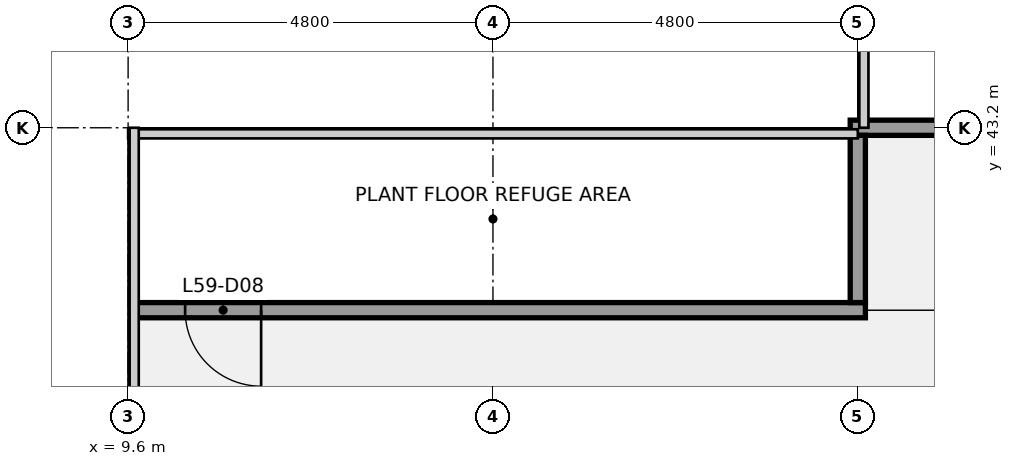
"""IFC4 building model, lengths in metres.
Left out: names, types, materials, properties, quantities, classifications, styles, units other than length and angle.
Written with IfcOpenShell. Run it as: python <this file> out.ifc"""

import sys

from ifc_helpers import new_model, si_unit, direction, frame, frame_2d, origin, place, context, subcontext, project, spatial, rectangle, extrude, element, fill, save


model = new_model("IFC4")
c1 = context("Model", 3, precision=1e-05, world=origin(), true_north=direction((0.0, 1.0)))
c2 = subcontext(c1, "Body", "Model", "MODEL_VIEW")
j1 = project(units=[si_unit("LENGTHUNIT", "METRE"), si_unit("PLANEANGLEUNIT", "RADIAN")], contexts=[c1])
p1 = place(None, origin())
s1 = spatial("IfcSite", under=j1, at=p1, CompositionType="ELEMENT")
p2 = place(p1, origin())
s2 = spatial("IfcBuilding", under=s1, at=p2, CompositionType="ELEMENT")
p3 = place(p2, frame((0.0, 0.0, 265.2)))
s3 = spatial("IfcBuildingStorey", under=s2, at=p3, CompositionType="ELEMENT", Elevation=265.2)
p4 = place(p3, frame((9.7, 40.8, 0.0), z_axis=(0.0, 0.0, 1.0), x_axis=(1.0, 0.0, 0.0)))
e1 = element("IfcWall", 1, at=p4, inside=s3, PredefinedType="PARTITIONING", context=c2, shape_type="SweptSolid", body=[
    extrude(rectangle(XDim=9.6, YDim=0.2, at=frame_2d((4.8, 0.0))), origin(), (0.0, 0.0, 1.0), 2.993),
])
p5 = place(p4, frame((0.65, 0.0, 0.0)))
e2 = element("IfcOpeningElement", 2, at=p5, cuts=e1, PredefinedType="OPENING", context=c2, shape_type="SweptSolid", body=[
    extrude(rectangle(XDim=1.0, YDim=2.1, at=frame_2d((0.5, 1.05))), frame((0.0, 0.11, 0.0), z_axis=(0.0, -1.0, 0.0), x_axis=(1.0, 0.0, 0.0)), (0.0, 0.0, 1.0), 0.22),
])
p6 = place(p3, frame((19.1, 43.2, 0.0), z_axis=(0.0, 0.0, 1.0), x_axis=(1.0, 0.0, 0.0)))
e3 = element("IfcWall", 3, at=p6, inside=s3, PredefinedType="PARTITIONING", context=c2, shape_type="SweptSolid", body=[
    extrude(rectangle(XDim=19.4, YDim=0.2, at=frame_2d((9.7, 0.0))), origin(), (0.0, 0.0, 1.0), 2.993),
])
p7 = place(p6, frame((4.4, 0.0, 0.0)))
e4 = element("IfcOpeningElement", 4, at=p7, cuts=e3, PredefinedType="OPENING", context=c2, shape_type="SweptSolid", body=[
    extrude(rectangle(XDim=1.0, YDim=2.1, at=frame_2d((0.5, 1.05))), frame((0.0, 0.11, 0.0), z_axis=(0.0, -1.0, 0.0), x_axis=(1.0, 0.0, 0.0)), (0.0, 0.0, 1.0), 0.22),
])
p8 = place(p6, frame((11.6, 0.0, 0.0)))
e5 = element("IfcOpeningElement", 5, at=p8, cuts=e3, PredefinedType="OPENING", context=c2, shape_type="SweptSolid", body=[
    extrude(rectangle(XDim=1.0, YDim=2.1, at=frame_2d((0.5, 1.05))), frame((0.0, 0.11, 0.0), z_axis=(0.0, -1.0, 0.0), x_axis=(1.0, 0.0, 0.0)), (0.0, 0.0, 1.0), 0.22),
])
p9 = place(p6, frame((16.4, 0.0, 0.0)))
e6 = element("IfcOpeningElement", 6, at=p9, cuts=e3, PredefinedType="OPENING", context=c2, shape_type="SweptSolid", body=[
    extrude(rectangle(XDim=1.0, YDim=2.1, at=frame_2d((0.5, 1.05))), frame((0.0, 0.11, 0.0), z_axis=(0.0, -1.0, 0.0), x_axis=(1.0, 0.0, 0.0)), (0.0, 0.0, 1.0), 0.22),
])
p10 = place(p3, frame((19.2, 40.9, 0.0), z_axis=(0.0, 0.0, 1.0), x_axis=(0.0, 1.0, 0.0)))
e7 = element("IfcWall", 7, at=p10, inside=s3, PredefinedType="PARTITIONING", context=c2, shape_type="SweptSolid", body=[
    extrude(rectangle(XDim=2.2, YDim=0.2, at=frame_2d((1.1, 0.0))), origin(), (0.0, 0.0, 1.0), 2.993),
])
p11 = place(p5, origin())
e8 = element("IfcDoor", 8, at=p11, inside=s3, OperationType="SINGLE_SWING_RIGHT", PredefinedType="DOOR", context=c2, shape_type="SweptSolid", body=[
    extrude(rectangle(XDim=1.0, YDim=2.1, at=frame_2d((0.5, 1.05))), frame((0.0, 0.025, 0.0), z_axis=(0.0, -1.0, 0.0), x_axis=(1.0, 0.0, 0.0)), (0.0, 0.0, 1.0), 0.05),
])
fill(e2, e8)
save(model, sys.argv[1])
